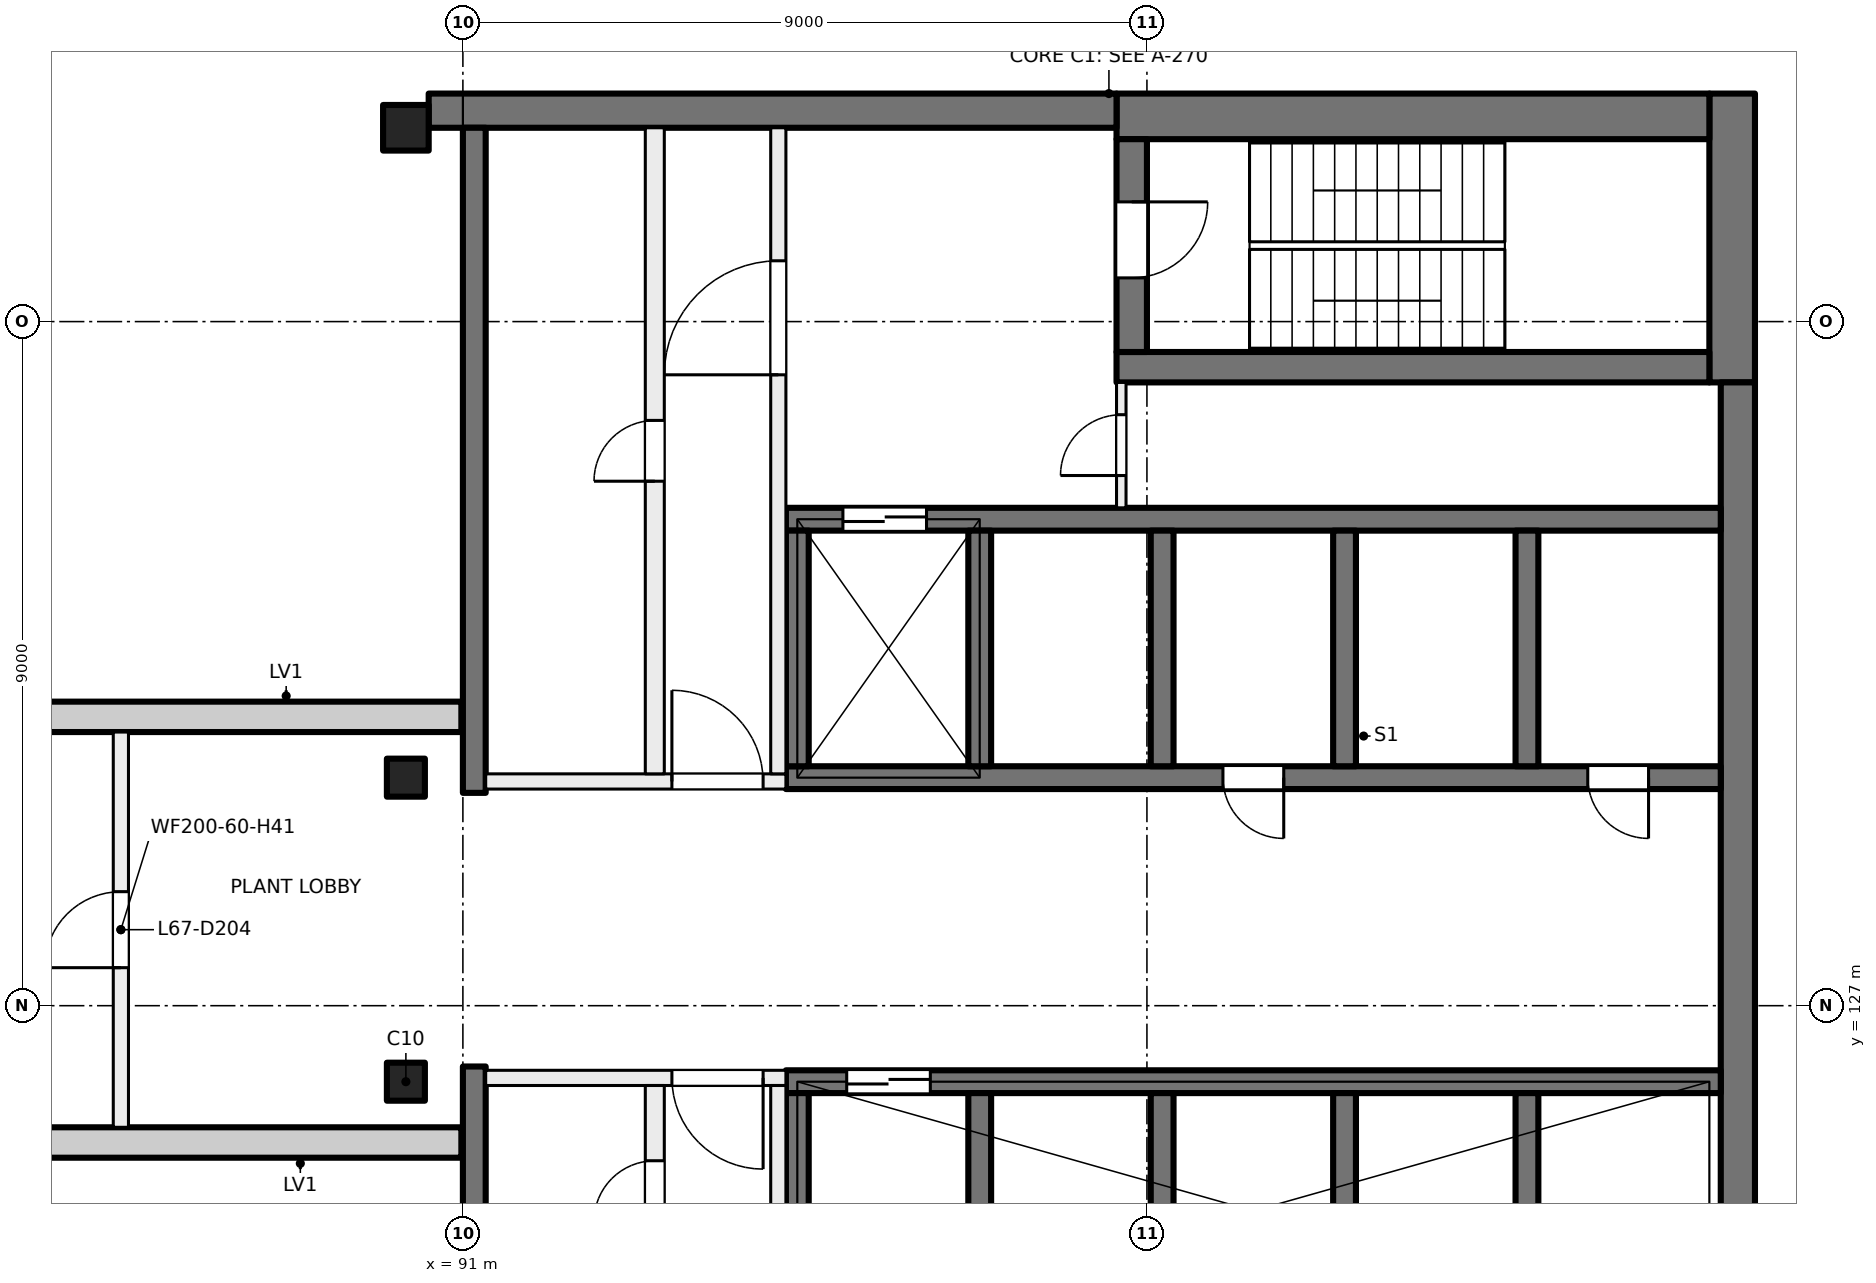
"""IFC4 building model, lengths in metres.
Left out: names, types, materials, properties, quantities, classifications, styles, units other than length and angle.
Written with IfcOpenShell. Run it as: python <this file> out.ifc"""

import sys

from ifc_helpers import new_model, si_unit, direction, frame, frame_2d, origin, origin_2d, place, context, subcontext, project, spatial, rectangle, extrude, element, fill, save


model = new_model("IFC4")
c1 = context("Model", 3, precision=1e-05, world=origin(), true_north=direction((0.0, 1.0)))
c2 = subcontext(c1, "Body", "Model", "MODEL_VIEW")
j1 = project(units=[si_unit("LENGTHUNIT", "METRE"), si_unit("PLANEANGLEUNIT", "RADIAN")], contexts=[c1])
p1 = place(None, origin())
s1 = spatial("IfcSite", under=j1, at=p1, CompositionType="ELEMENT")
p2 = place(p1, origin())
s2 = spatial("IfcBuilding", under=s1, at=p2, CompositionType="ELEMENT")
p3 = place(p2, frame((0.0, 0.0, 282.0)))
s3 = spatial("IfcBuildingStorey", under=s2, at=p3, CompositionType="ELEMENT", Elevation=282.0)
for number, where, z_axis, x_axis in (
    (1, (90.25, 130.0, 0.0), (0.0, 0.0, 1.0), (1.0, 0.0, 0.0)),
    (2, (90.25, 126.0, 0.0), (0.0, 0.0, 1.0), (1.0, 0.0, 0.0)),
):
    element("IfcColumn", number, at=place(p3, frame(where, z_axis=z_axis, x_axis=x_axis)), inside=s3, PredefinedType="COLUMN", context=c2, shape_type="SweptSolid", body=[
        extrude(rectangle(XDim=0.5, YDim=0.5, at=origin_2d()), origin(), (0.0, 0.0, 1.0), 4.5),
    ])
p4 = place(p3, frame((90.25, 138.55, 0.0), z_axis=(0.0, 0.0, 1.0), x_axis=(1.0, 0.0, 0.0)))
e3 = element("IfcColumn", 3, at=p4, inside=s3, PredefinedType="COLUMN", context=c2, shape_type="SweptSolid", body=[
    extrude(rectangle(XDim=0.6, YDim=0.6, at=origin_2d()), origin(), (0.0, 0.0, 1.0), 4.5),
])
p5 = place(p3, frame((107.7, 139.0, 0.0), z_axis=(0.0, 0.0, 1.0), x_axis=(0.0, -1.0, 0.0)))
e4 = element("IfcWall", 4, at=p5, inside=s3, PredefinedType="SHEAR", context=c2, shape_type="SweptSolid", body=[
    extrude(rectangle(XDim=3.8, YDim=0.6, at=frame_2d((1.9, 0.0))), origin(), (0.0, 0.0, 1.0), 4.5),
])
p6 = place(p3, frame((107.775, 135.2, 0.0), z_axis=(0.0, 0.0, 1.0), x_axis=(0.0, -1.0, 0.0)))
e5 = element("IfcWall", 5, at=p6, inside=s3, PredefinedType="SHEAR", context=c2, shape_type="SweptSolid", body=[
    extrude(rectangle(XDim=14.4, YDim=0.45, at=frame_2d((7.2, 0.0))), origin(), (0.0, 0.0, 1.0), 4.5),
])
p7 = place(p3, frame((107.4, 138.7, 0.0), z_axis=(0.0, 0.0, 1.0), x_axis=(-1.0, 0.0, 0.0)))
e6 = element("IfcWall", 6, at=p7, inside=s3, PredefinedType="SHEAR", context=c2, shape_type="SweptSolid", body=[
    extrude(rectangle(XDim=7.8, YDim=0.6, at=frame_2d((3.9, 0.0))), origin(), (0.0, 0.0, 1.0), 4.5),
])
p8 = place(p3, frame((99.6, 138.775, 0.0), z_axis=(0.0, 0.0, 1.0), x_axis=(-1.0, 0.0, 0.0)))
e7 = element("IfcWall", 7, at=p8, inside=s3, PredefinedType="SHEAR", context=c2, shape_type="SweptSolid", body=[
    extrude(rectangle(XDim=9.05, YDim=0.45, at=frame_2d((4.525, 0.0))), origin(), (0.0, 0.0, 1.0), 4.5),
])
p9 = place(p3, frame((107.4, 135.4, 0.0), z_axis=(0.0, 0.0, 1.0), x_axis=(-1.0, 0.0, 0.0)))
e8 = element("IfcWall", 8, at=p9, inside=s3, PredefinedType="SHEAR", context=c2, shape_type="SweptSolid", body=[
    extrude(rectangle(XDim=7.8, YDim=0.4, at=frame_2d((3.9, 0.0))), origin(), (0.0, 0.0, 1.0), 4.5),
])
p10 = place(p3, frame((99.8, 138.4, 0.0), z_axis=(0.0, 0.0, 1.0), x_axis=(0.0, -1.0, 0.0)))
e9 = element("IfcWall", 9, at=p10, inside=s3, PredefinedType="SHEAR", context=c2, shape_type="SweptSolid", body=[
    extrude(rectangle(XDim=2.8, YDim=0.4, at=frame_2d((1.4, 0.0))), origin(), (0.0, 0.0, 1.0), 4.5),
])
p11 = place(p10, frame((0.825, 0.0, 0.0)))
e10 = element("IfcOpeningElement", 10, at=p11, cuts=e9, PredefinedType="OPENING", context=c2, shape_type="SweptSolid", body=[
    extrude(rectangle(XDim=1.0, YDim=2.1, at=frame_2d((0.5, 1.05))), frame((0.0, 0.21, 0.0), z_axis=(0.0, -1.0, 0.0), x_axis=(1.0, 0.0, 0.0)), (0.0, 0.0, 1.0), 0.42),
])
p12 = place(p3, frame((107.55, 130.0, 0.0), z_axis=(0.0, 0.0, 1.0), x_axis=(-1.0, 0.0, 0.0)))
e11 = element("IfcWall", 11, at=p12, inside=s3, PredefinedType="SHEAR", context=c2, shape_type="SweptSolid", body=[
    extrude(rectangle(XDim=12.3, YDim=0.3, at=frame_2d((6.15, 0.0))), origin(), (0.0, 0.0, 1.0), 4.5),
])
p13 = place(p12, frame((0.95, 0.0, 0.0)))
e12 = element("IfcOpeningElement", 12, at=p13, cuts=e11, PredefinedType="OPENING", context=c2, shape_type="SweptSolid", body=[
    extrude(rectangle(XDim=0.8, YDim=2.1, at=frame_2d((0.4, 1.05))), frame((0.0, 0.16, 0.0), z_axis=(0.0, -1.0, 0.0), x_axis=(1.0, 0.0, 0.0)), (0.0, 0.0, 1.0), 0.32),
])
p14 = place(p12, frame((5.75, 0.0, 0.0)))
e13 = element("IfcOpeningElement", 13, at=p14, cuts=e11, PredefinedType="OPENING", context=c2, shape_type="SweptSolid", body=[
    extrude(rectangle(XDim=0.8, YDim=2.1, at=frame_2d((0.4, 1.05))), frame((0.0, 0.16, 0.0), z_axis=(0.0, -1.0, 0.0), x_axis=(1.0, 0.0, 0.0)), (0.0, 0.0, 1.0), 0.32),
])
p15 = place(p3, frame((107.55, 133.4, 0.0), z_axis=(0.0, 0.0, 1.0), x_axis=(-1.0, 0.0, 0.0)))
e14 = element("IfcWall", 14, at=p15, inside=s3, PredefinedType="SHEAR", context=c2, shape_type="SweptSolid", body=[
    extrude(rectangle(XDim=12.3, YDim=0.3, at=frame_2d((6.15, 0.0))), origin(), (0.0, 0.0, 1.0), 4.5),
])
p16 = place(p15, frame((10.45, 0.0, 0.0)))
e15 = element("IfcOpeningElement", 15, at=p16, cuts=e14, PredefinedType="OPENING", context=c2, shape_type="SweptSolid", body=[
    extrude(rectangle(XDim=1.1, YDim=2.1, at=frame_2d((0.55, 1.05))), frame((0.0, 0.16, 0.0), z_axis=(0.0, -1.0, 0.0), x_axis=(1.0, 0.0, 0.0)), (0.0, 0.0, 1.0), 0.32),
])
for number, where, z_axis, x_axis in (
    (16, (105.0, 133.25, 0.0), (0.0, 0.0, 1.0), (0.0, -1.0, 0.0)),
    (17, (102.6, 133.25, 0.0), (0.0, 0.0, 1.0), (0.0, -1.0, 0.0)),
    (18, (100.2, 133.25, 0.0), (0.0, 0.0, 1.0), (0.0, -1.0, 0.0)),
    (19, (97.8, 133.25, 0.0), (0.0, 0.0, 1.0), (0.0, -1.0, 0.0)),
    (20, (95.4, 133.25, 0.0), (0.0, 0.0, 1.0), (0.0, -1.0, 0.0)),
):
    element("IfcWall", number, at=place(p3, frame(where, z_axis=z_axis, x_axis=x_axis)), inside=s3, PredefinedType="SHEAR", context=c2, shape_type="SweptSolid", body=[
        extrude(rectangle(XDim=3.1, YDim=0.3, at=frame_2d((1.55, 0.0))), origin(), (0.0, 0.0, 1.0), 4.5),
    ])
p17 = place(p3, frame((107.55, 126.0, 0.0), z_axis=(0.0, 0.0, 1.0), x_axis=(-1.0, 0.0, 0.0)))
e21 = element("IfcWall", 21, at=p17, inside=s3, PredefinedType="SHEAR", context=c2, shape_type="SweptSolid", body=[
    extrude(rectangle(XDim=12.3, YDim=0.3, at=frame_2d((6.15, 0.0))), origin(), (0.0, 0.0, 1.0), 4.5),
])
p18 = place(p17, frame((10.4, 0.0, 0.0)))
e22 = element("IfcOpeningElement", 22, at=p18, cuts=e21, PredefinedType="OPENING", context=c2, shape_type="SweptSolid", body=[
    extrude(rectangle(XDim=1.1, YDim=2.1, at=frame_2d((0.55, 1.05))), frame((0.0, 0.16, 0.0), z_axis=(0.0, -1.0, 0.0), x_axis=(1.0, 0.0, 0.0)), (0.0, 0.0, 1.0), 0.32),
])
for number, where, z_axis, x_axis in (
    (23, (105.0, 125.85, 0.0), (0.0, 0.0, 1.0), (0.0, -1.0, 0.0)),
    (24, (102.6, 125.85, 0.0), (0.0, 0.0, 1.0), (0.0, -1.0, 0.0)),
    (25, (100.2, 125.85, 0.0), (0.0, 0.0, 1.0), (0.0, -1.0, 0.0)),
    (26, (97.8, 125.85, 0.0), (0.0, 0.0, 1.0), (0.0, -1.0, 0.0)),
    (27, (95.4, 125.85, 0.0), (0.0, 0.0, 1.0), (0.0, -1.0, 0.0)),
):
    element("IfcWall", number, at=place(p3, frame(where, z_axis=z_axis, x_axis=x_axis)), inside=s3, PredefinedType="SHEAR", context=c2, shape_type="SweptSolid", body=[
        extrude(rectangle(XDim=3.1, YDim=0.3, at=frame_2d((1.55, 0.0))), origin(), (0.0, 0.0, 1.0), 4.5),
    ])
for number, where, z_axis, x_axis in (
    (28, (91.15, 138.55, 0.0), (0.0, 0.0, 1.0), (0.0, -1.0, 0.0)),
    (29, (91.15, 126.2, 0.0), (0.0, 0.0, 1.0), (0.0, -1.0, 0.0)),
):
    element("IfcWall", number, at=place(p3, frame(where, z_axis=z_axis, x_axis=x_axis)), inside=s3, PredefinedType="SHEAR", context=c2, shape_type="SweptSolid", body=[
        extrude(rectangle(XDim=8.75, YDim=0.3, at=frame_2d((4.375, 0.0))), origin(), (0.0, 0.0, 1.0), 4.5),
    ])
p19 = place(p3, frame((90.98, 125.2, 0.0), z_axis=(0.0, 0.0, 1.0), x_axis=(-1.0, 0.0, 0.0)))
e30 = element("IfcWall", 30, at=p19, inside=s3, PredefinedType="SOLIDWALL", context=c2, shape_type="SweptSolid", body=[
    extrude(rectangle(XDim=38.48, YDim=0.4, at=frame_2d((19.24, 0.0))), origin(), (0.0, 0.0, 1.0), 4.125),
])
p20 = place(p3, frame((72.42, 130.8, 0.0), z_axis=(0.0, 0.0, 1.0), x_axis=(1.0, 0.0, 0.0)))
e31 = element("IfcWall", 31, at=p20, inside=s3, PredefinedType="SOLIDWALL", context=c2, shape_type="SweptSolid", body=[
    extrude(rectangle(XDim=18.56, YDim=0.4, at=frame_2d((9.28, 0.0))), origin(), (0.0, 0.0, 1.0), 4.125),
])
p21 = place(p3, frame((95.25, 126.05, 0.0), z_axis=(0.0, 0.0, 1.0), x_axis=(-1.0, 0.0, 0.0)))
e32 = element("IfcWall", 32, at=p21, inside=s3, PredefinedType="PARTITIONING", context=c2, shape_type="SweptSolid", body=[
    extrude(rectangle(XDim=3.95, YDim=0.2, at=frame_2d((1.975, 0.0))), origin(), (0.0, 0.0, 1.0), 4.125),
])
p22 = place(p21, frame((0.3, 0.0, 0.0)))
e33 = element("IfcOpeningElement", 33, at=p22, cuts=e32, PredefinedType="OPENING", context=c2, shape_type="SweptSolid", body=[
    extrude(rectangle(XDim=1.2, YDim=2.1, at=frame_2d((0.6, 1.05))), frame((0.0, 0.11, 0.0), z_axis=(0.0, -1.0, 0.0), x_axis=(1.0, 0.0, 0.0)), (0.0, 0.0, 1.0), 0.22),
])
p23 = place(p3, frame((95.15, 117.45, 0.0), z_axis=(0.0, 0.0, 1.0), x_axis=(0.0, 1.0, 0.0)))
e34 = element("IfcWall", 34, at=p23, inside=s3, PredefinedType="PARTITIONING", context=c2, shape_type="SweptSolid", body=[
    extrude(rectangle(XDim=8.5, YDim=0.2, at=frame_2d((4.25, 0.0))), origin(), (0.0, 0.0, 1.0), 4.125),
])
p24 = place(p23, frame((1.75, 0.0, 0.0)))
e35 = element("IfcOpeningElement", 35, at=p24, cuts=e34, PredefinedType="OPENING", context=c2, shape_type="SweptSolid", body=[
    extrude(rectangle(XDim=1.5, YDim=2.1, at=frame_2d((0.75, 1.05))), frame((0.0, 0.11, 0.0), z_axis=(0.0, -1.0, 0.0), x_axis=(1.0, 0.0, 0.0)), (0.0, 0.0, 1.0), 0.22),
])
p25 = place(p3, frame((93.525, 117.45, 0.0), z_axis=(0.0, 0.0, 1.0), x_axis=(0.0, 1.0, 0.0)))
e36 = element("IfcWall", 36, at=p25, inside=s3, PredefinedType="PARTITIONING", context=c2, shape_type="SweptSolid", body=[
    extrude(rectangle(XDim=8.5, YDim=0.25, at=frame_2d((4.25, 0.0))), origin(), (0.0, 0.0, 1.0), 4.125),
])
p26 = place(p25, frame((6.71, 0.0, 0.0)))
e37 = element("IfcOpeningElement", 37, at=p26, cuts=e36, PredefinedType="OPENING", context=c2, shape_type="SweptSolid", body=[
    extrude(rectangle(XDim=0.8, YDim=2.1, at=frame_2d((0.4, 1.05))), frame((0.0, 0.135, 0.0), z_axis=(0.0, -1.0, 0.0), x_axis=(1.0, 0.0, 0.0)), (0.0, 0.0, 1.0), 0.27),
])
p27 = place(p25, frame((2.31, 0.0, 0.0)))
e38 = element("IfcOpeningElement", 38, at=p27, cuts=e36, PredefinedType="OPENING", context=c2, shape_type="SweptSolid", body=[
    extrude(rectangle(XDim=1.0, YDim=2.1, at=frame_2d((0.5, 1.05))), frame((0.0, 0.135, 0.0), z_axis=(0.0, -1.0, 0.0), x_axis=(1.0, 0.0, 0.0)), (0.0, 0.0, 1.0), 0.27),
])
p28 = place(p3, frame((91.3, 129.95, 0.0), z_axis=(0.0, 0.0, 1.0), x_axis=(1.0, 0.0, 0.0)))
e39 = element("IfcWall", 39, at=p28, inside=s3, PredefinedType="PARTITIONING", context=c2, shape_type="SweptSolid", body=[
    extrude(rectangle(XDim=3.95, YDim=0.2, at=frame_2d((1.975, 0.0))), origin(), (0.0, 0.0, 1.0), 4.125),
])
p29 = place(p28, frame((2.45, 0.0, 0.0)))
e40 = element("IfcOpeningElement", 40, at=p29, cuts=e39, PredefinedType="OPENING", context=c2, shape_type="SweptSolid", body=[
    extrude(rectangle(XDim=1.2, YDim=2.1, at=frame_2d((0.6, 1.05))), frame((0.0, 0.11, 0.0), z_axis=(0.0, -1.0, 0.0), x_axis=(1.0, 0.0, 0.0)), (0.0, 0.0, 1.0), 0.22),
])
p30 = place(p3, frame((95.15, 130.05, 0.0), z_axis=(0.0, 0.0, 1.0), x_axis=(0.0, 1.0, 0.0)))
e41 = element("IfcWall", 41, at=p30, inside=s3, PredefinedType="PARTITIONING", context=c2, shape_type="SweptSolid", body=[
    extrude(rectangle(XDim=8.5, YDim=0.2, at=frame_2d((4.25, 0.0))), origin(), (0.0, 0.0, 1.0), 4.125),
])
p31 = place(p30, frame((5.25, 0.0, 0.0)))
e42 = element("IfcOpeningElement", 42, at=p31, cuts=e41, PredefinedType="OPENING", context=c2, shape_type="SweptSolid", body=[
    extrude(rectangle(XDim=1.5, YDim=2.1, at=frame_2d((0.75, 1.05))), frame((0.0, 0.11, 0.0), z_axis=(0.0, -1.0, 0.0), x_axis=(1.0, 0.0, 0.0)), (0.0, 0.0, 1.0), 0.22),
])
p32 = place(p3, frame((93.525, 130.05, 0.0), z_axis=(0.0, 0.0, 1.0), x_axis=(0.0, 1.0, 0.0)))
e43 = element("IfcWall", 43, at=p32, inside=s3, PredefinedType="PARTITIONING", context=c2, shape_type="SweptSolid", body=[
    extrude(rectangle(XDim=8.5, YDim=0.25, at=frame_2d((4.25, 0.0))), origin(), (0.0, 0.0, 1.0), 4.125),
])
p33 = place(p32, frame((3.85, 0.0, 0.0)))
e44 = element("IfcOpeningElement", 44, at=p33, cuts=e43, PredefinedType="OPENING", context=c2, shape_type="SweptSolid", body=[
    extrude(rectangle(XDim=0.8, YDim=2.1, at=frame_2d((0.4, 1.05))), frame((0.0, 0.135, 0.0), z_axis=(0.0, -1.0, 0.0), x_axis=(1.0, 0.0, 0.0)), (0.0, 0.0, 1.0), 0.27),
])
p34 = place(p3, frame((99.663, 133.55, 0.0), z_axis=(0.0, 0.0, 1.0), x_axis=(0.0, 1.0, 0.0)))
e45 = element("IfcWall", 45, at=p34, inside=s3, PredefinedType="PARTITIONING", context=c2, shape_type="SweptSolid", body=[
    extrude(rectangle(XDim=1.65, YDim=0.125, at=frame_2d((0.825, 0.0))), origin(), (0.0, 0.0, 1.0), 4.125),
])
p35 = place(p34, frame((0.425, 0.0, 0.0)))
e46 = element("IfcOpeningElement", 46, at=p35, cuts=e45, PredefinedType="OPENING", context=c2, shape_type="SweptSolid", body=[
    extrude(rectangle(XDim=0.8, YDim=2.1, at=frame_2d((0.4, 1.05))), frame((0.0, 0.073, 0.0), z_axis=(0.0, -1.0, 0.0), x_axis=(1.0, 0.0, 0.0)), (0.0, 0.0, 1.0), 0.145),
])
p36 = place(p3, frame((86.5, 125.4, 0.0), z_axis=(0.0, 0.0, 1.0), x_axis=(0.0, 1.0, 0.0)))
e47 = element("IfcWall", 47, at=p36, inside=s3, PredefinedType="PARTITIONING", context=c2, shape_type="SweptSolid", body=[
    extrude(rectangle(XDim=5.2, YDim=0.2, at=frame_2d((2.6, 0.0))), origin(), (0.0, 0.0, 1.0), 4.125),
])
p37 = place(p36, frame((2.1, 0.0, 0.0)))
e48 = element("IfcOpeningElement", 48, at=p37, cuts=e47, PredefinedType="OPENING", context=c2, shape_type="SweptSolid", body=[
    extrude(rectangle(XDim=1.0, YDim=2.1, at=frame_2d((0.5, 1.05))), frame((0.0, 0.11, 0.0), z_axis=(0.0, -1.0, 0.0), x_axis=(1.0, 0.0, 0.0)), (0.0, 0.0, 1.0), 0.22),
])
p38 = place(p18, origin())
e49 = element("IfcDoor", 49, at=p38, inside=s3, OperationType="DOUBLE_DOOR_SLIDING", PredefinedType="DOOR", context=c2, shape_type="SweptSolid", body=[
    extrude(rectangle(XDim=1.1, YDim=2.1, at=frame_2d((0.55, 1.05))), frame((0.0, 0.025, 0.0), z_axis=(0.0, -1.0, 0.0), x_axis=(1.0, 0.0, 0.0)), (0.0, 0.0, 1.0), 0.05),
])
fill(e22, e49)
p39 = place(p13, origin())
e50 = element("IfcDoor", 50, at=p39, inside=s3, OperationType="SINGLE_SWING_LEFT", PredefinedType="DOOR", context=c2, shape_type="SweptSolid", body=[
    extrude(rectangle(XDim=0.8, YDim=2.1, at=frame_2d((0.4, 1.05))), frame((0.0, 0.025, 0.0), z_axis=(0.0, -1.0, 0.0), x_axis=(1.0, 0.0, 0.0)), (0.0, 0.0, 1.0), 0.05),
])
fill(e12, e50)
p40 = place(p14, origin())
e51 = element("IfcDoor", 51, at=p40, inside=s3, OperationType="SINGLE_SWING_RIGHT", PredefinedType="DOOR", context=c2, shape_type="SweptSolid", body=[
    extrude(rectangle(XDim=0.8, YDim=2.1, at=frame_2d((0.4, 1.05))), frame((0.0, 0.025, 0.0), z_axis=(0.0, -1.0, 0.0), x_axis=(1.0, 0.0, 0.0)), (0.0, 0.0, 1.0), 0.05),
])
fill(e13, e51)
p41 = place(p22, origin())
e52 = element("IfcDoor", 52, at=p41, inside=s3, OperationType="DOUBLE_DOOR_SINGLE_SWING", PredefinedType="DOOR", context=c2, shape_type="SweptSolid", body=[
    extrude(rectangle(XDim=1.2, YDim=2.1, at=frame_2d((0.6, 1.05))), frame((0.0, 0.025, 0.0), z_axis=(0.0, -1.0, 0.0), x_axis=(1.0, 0.0, 0.0)), (0.0, 0.0, 1.0), 0.05),
])
fill(e33, e52)
p42 = place(p26, origin())
e53 = element("IfcDoor", 53, at=p42, inside=s3, OperationType="SINGLE_SWING_LEFT", PredefinedType="DOOR", context=c2, shape_type="SweptSolid", body=[
    extrude(rectangle(XDim=0.8, YDim=2.1, at=frame_2d((0.4, 1.05))), frame((0.0, 0.025, 0.0), z_axis=(0.0, -1.0, 0.0), x_axis=(1.0, 0.0, 0.0)), (0.0, 0.0, 1.0), 0.05),
])
fill(e37, e53)
p43 = place(p29, origin())
e54 = element("IfcDoor", 54, at=p43, inside=s3, OperationType="DOUBLE_DOOR_SINGLE_SWING", PredefinedType="DOOR", context=c2, shape_type="SweptSolid", body=[
    extrude(rectangle(XDim=1.2, YDim=2.1, at=frame_2d((0.6, 1.05))), frame((0.0, 0.025, 0.0), z_axis=(0.0, -1.0, 0.0), x_axis=(1.0, 0.0, 0.0)), (0.0, 0.0, 1.0), 0.05),
])
fill(e40, e54)
p44 = place(p31, origin())
e55 = element("IfcDoor", 55, at=p44, inside=s3, OperationType="DOUBLE_DOOR_SINGLE_SWING", PredefinedType="DOOR", context=c2, shape_type="SweptSolid", body=[
    extrude(rectangle(XDim=1.5, YDim=2.1, at=frame_2d((0.75, 1.05))), frame((0.0, 0.025, 0.0), z_axis=(0.0, -1.0, 0.0), x_axis=(1.0, 0.0, 0.0)), (0.0, 0.0, 1.0), 0.05),
])
fill(e42, e55)
p45 = place(p11, origin())
e56 = element("IfcDoor", 56, at=p45, inside=s3, OperationType="SINGLE_SWING_RIGHT", PredefinedType="DOOR", context=c2, shape_type="SweptSolid", body=[
    extrude(rectangle(XDim=1.0, YDim=2.1, at=frame_2d((0.5, 1.05))), frame((0.0, 0.025, 0.0), z_axis=(0.0, -1.0, 0.0), x_axis=(1.0, 0.0, 0.0)), (0.0, 0.0, 1.0), 0.05),
])
fill(e10, e56)
p46 = place(p35, origin())
e57 = element("IfcDoor", 57, at=p46, inside=s3, OperationType="SINGLE_SWING_LEFT", PredefinedType="DOOR", context=c2, shape_type="SweptSolid", body=[
    extrude(rectangle(XDim=0.8, YDim=2.1, at=frame_2d((0.4, 1.05))), frame((0.0, 0.025, 0.0), z_axis=(0.0, -1.0, 0.0), x_axis=(1.0, 0.0, 0.0)), (0.0, 0.0, 1.0), 0.05),
])
fill(e46, e57)
p47 = place(p33, origin())
e58 = element("IfcDoor", 58, at=p47, inside=s3, OperationType="SINGLE_SWING_RIGHT", PredefinedType="DOOR", context=c2, shape_type="SweptSolid", body=[
    extrude(rectangle(XDim=0.8, YDim=2.1, at=frame_2d((0.4, 1.05))), frame((0.0, 0.025, 0.0), z_axis=(0.0, -1.0, 0.0), x_axis=(1.0, 0.0, 0.0)), (0.0, 0.0, 1.0), 0.05),
])
fill(e44, e58)
p48 = place(p16, origin())
e59 = element("IfcDoor", 59, at=p48, inside=s3, OperationType="DOUBLE_DOOR_SLIDING", PredefinedType="DOOR", context=c2, shape_type="SweptSolid", body=[
    extrude(rectangle(XDim=1.1, YDim=2.1, at=frame_2d((0.55, 1.05))), frame((0.0, 0.025, 0.0), z_axis=(0.0, -1.0, 0.0), x_axis=(1.0, 0.0, 0.0)), (0.0, 0.0, 1.0), 0.05),
])
fill(e15, e59)
p49 = place(p37, origin())
e60 = element("IfcDoor", 60, at=p49, inside=s3, OperationType="SINGLE_SWING_LEFT", PredefinedType="DOOR", context=c2, shape_type="SweptSolid", body=[
    extrude(rectangle(XDim=1.0, YDim=2.1, at=frame_2d((0.5, 1.05))), frame((0.0, 0.025, 0.0), z_axis=(0.0, -1.0, 0.0), x_axis=(1.0, 0.0, 0.0)), (0.0, 0.0, 1.0), 0.05),
])
fill(e48, e60)
save(model, sys.argv[1])
